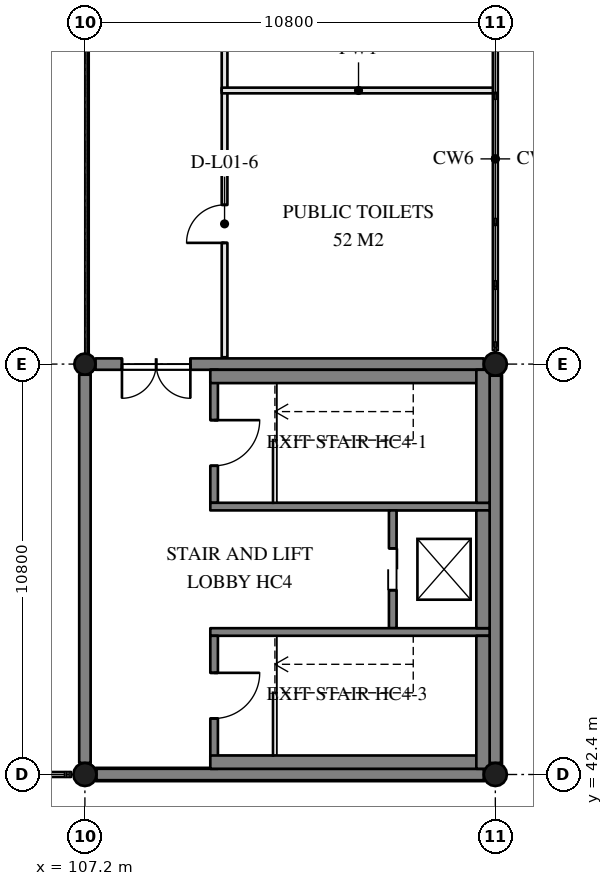
"""IFC4 building model, lengths in metres.
Left out: names, types, materials, properties, quantities, classifications, styles, units other than length and angle.
Written with IfcOpenShell. Run it as: python <this file> out.ifc"""

import sys

from ifc_helpers import new_model, si_unit, direction, frame, frame_2d, origin, origin_2d, place, context, subcontext, project, spatial, rectangle, hollow_circle, extrude, element, fill, save


model = new_model("IFC4")
c1 = context("Model", 3, precision=1e-05, world=origin(), true_north=direction((0.0, 1.0)))
c2 = subcontext(c1, "Body", "Model", "MODEL_VIEW")
j1 = project(units=[si_unit("LENGTHUNIT", "METRE"), si_unit("PLANEANGLEUNIT", "RADIAN")], contexts=[c1])
p1 = place(None, origin())
s1 = spatial("IfcSite", under=j1, at=p1, CompositionType="ELEMENT")
p2 = place(p1, origin())
s2 = spatial("IfcBuilding", under=s1, at=p2, CompositionType="ELEMENT")
p3 = place(p2, frame((0.0, 0.0, 4.8)))
s3 = spatial("IfcBuildingStorey", under=s2, at=p3, CompositionType="ELEMENT", Elevation=4.8)
p4 = place(p3, frame((107.2, 42.4, 0.0), z_axis=(0.0, 0.0, 1.0), x_axis=(1.0, 0.0, 0.0)))
e1 = element("IfcColumn", 1, at=p4, inside=s3, PredefinedType="COLUMN", context=c2, shape_type="SweptSolid", body=[
    extrude(hollow_circle(Radius=0.305, WallThickness=0.025, at=origin_2d()), origin(), (0.0, 0.0, 1.0), 2.49),
])
p5 = place(p3, frame((107.2, 53.2, 0.0), z_axis=(0.0, 0.0, 1.0), x_axis=(1.0, 0.0, 0.0)))
e2 = element("IfcColumn", 2, at=p5, inside=s3, PredefinedType="COLUMN", context=c2, shape_type="SweptSolid", body=[
    extrude(hollow_circle(Radius=0.28, WallThickness=0.02, at=origin_2d()), origin(), (0.0, 0.0, 1.0), 2.564),
])
p6 = place(p3, frame((118.0, 42.4, 0.0), z_axis=(0.0, 0.0, 1.0), x_axis=(1.0, 0.0, 0.0)))
e3 = element("IfcColumn", 3, at=p6, inside=s3, PredefinedType="COLUMN", context=c2, shape_type="SweptSolid", body=[
    extrude(hollow_circle(Radius=0.305, WallThickness=0.025, at=origin_2d()), origin(), (0.0, 0.0, 1.0), 2.49),
])
p7 = place(p3, frame((118.0, 53.2, 0.0), z_axis=(0.0, 0.0, 1.0), x_axis=(1.0, 0.0, 0.0)))
e4 = element("IfcColumn", 4, at=p7, inside=s3, PredefinedType="COLUMN", context=c2, shape_type="SweptSolid", body=[
    extrude(hollow_circle(Radius=0.305, WallThickness=0.025, at=origin_2d()), origin(), (0.0, 0.0, 1.0), 2.564),
])
p8 = place(p3, frame((107.505, 42.4, 0.0), z_axis=(0.0, 0.0, 1.0), x_axis=(1.0, 0.0, 0.0)))
e5 = element("IfcWall", 5, at=p8, inside=s3, PredefinedType="SOLIDWALL", context=c2, shape_type="SweptSolid", body=[
    extrude(rectangle(XDim=10.19, YDim=0.3, at=frame_2d((5.095, 0.0))), origin(), (0.0, 0.0, 1.0), 3.9),
])
p9 = place(p3, frame((118.0, 42.705, 0.0), z_axis=(0.0, 0.0, 1.0), x_axis=(0.0, 1.0, 0.0)))
e6 = element("IfcWall", 6, at=p9, inside=s3, PredefinedType="SOLIDWALL", context=c2, shape_type="SweptSolid", body=[
    extrude(rectangle(XDim=10.19, YDim=0.3, at=frame_2d((5.095, 0.0))), origin(), (0.0, 0.0, 1.0), 3.9),
])
p10 = place(p3, frame((117.695, 53.2, 0.0), z_axis=(0.0, 0.0, 1.0), x_axis=(-1.0, 0.0, 0.0)))
e7 = element("IfcWall", 7, at=p10, inside=s3, PredefinedType="SOLIDWALL", context=c2, shape_type="SweptSolid", body=[
    extrude(rectangle(XDim=10.216, YDim=0.3, at=frame_2d((5.108, 0.0))), origin(), (0.0, 0.0, 1.0), 3.9),
])
p11 = place(p10, frame((7.72, 0.0, 0.0)))
e8 = element("IfcOpeningElement", 8, at=p11, cuts=e7, PredefinedType="OPENING", context=c2, shape_type="SweptSolid", body=[
    extrude(rectangle(XDim=1.8, YDim=2.1, at=frame_2d((0.9, 1.05))), frame((0.0, 0.16, 0.0), z_axis=(0.0, -1.0, 0.0), x_axis=(1.0, 0.0, 0.0)), (0.0, 0.0, 1.0), 0.32),
])
p12 = place(p3, frame((107.2, 52.92, 0.0), z_axis=(0.0, 0.0, 1.0), x_axis=(0.0, -1.0, 0.0)))
e9 = element("IfcWall", 9, at=p12, inside=s3, PredefinedType="SOLIDWALL", context=c2, shape_type="SweptSolid", body=[
    extrude(rectangle(XDim=10.215, YDim=0.3, at=frame_2d((5.108, 0.0))), origin(), (0.0, 0.0, 1.0), 3.9),
])
p13 = place(p3, frame((107.2, 53.2, 2.594), z_axis=(0.0, 0.0, 1.0), x_axis=(1.0, 0.0, 0.0)))
e10 = element("IfcColumn", 10, at=p13, inside=s3, PredefinedType="COLUMN", context=c2, shape_type="SweptSolid", body=[
    extrude(hollow_circle(Radius=0.203, WallThickness=0.016, at=origin_2d()), origin(), (0.0, 0.0, 1.0), 9.655),
])
p14 = place(p3, frame((107.48, 42.4, 3.9), z_axis=(0.0, 0.0, 1.0), x_axis=(1.0, 0.0, 0.0)))
e11 = element("IfcWall", 11, at=p14, inside=s3, PredefinedType="SOLIDWALL", context=c2, shape_type="SweptSolid", body=[
    extrude(rectangle(XDim=10.24, YDim=0.35, at=frame_2d((5.12, 0.0))), origin(), (0.0, 0.0, 1.0), 1.743),
])
p15 = place(p3, frame((118.0, 42.68, 3.9), z_axis=(0.0, 0.0, 1.0), x_axis=(0.0, 1.0, 0.0)))
e12 = element("IfcWall", 12, at=p15, inside=s3, PredefinedType="SOLIDWALL", context=c2, shape_type="SweptSolid", body=[
    extrude(rectangle(XDim=10.24, YDim=0.35, at=frame_2d((5.12, 0.0))), origin(), (0.0, 0.0, 1.0), 1.794),
])
p16 = place(p3, frame((110.6, 53.05, 0.0), z_axis=(0.0, 0.0, 1.0), x_axis=(0.0, -1.0, 0.0)))
e13 = element("IfcWall", 13, at=p16, inside=s3, PredefinedType="SOLIDWALL", context=c2, shape_type="SweptSolid", body=[
    extrude(rectangle(XDim=3.5, YDim=0.2, at=frame_2d((1.75, 0.0))), origin(), (0.0, 0.0, 1.0), 3.6),
])
p17 = place(p16, frame((1.325, 0.0, 0.0)))
e14 = element("IfcOpeningElement", 14, at=p17, cuts=e13, PredefinedType="OPENING", context=c2, shape_type="SweptSolid", body=[
    extrude(rectangle(XDim=1.2, YDim=2.1, at=frame_2d((0.6, 1.05))), frame((0.0, 0.11, 0.0), z_axis=(0.0, -1.0, 0.0), x_axis=(1.0, 0.0, 0.0)), (0.0, 0.0, 1.0), 0.22),
])
p18 = place(p3, frame((110.5, 49.45, 0.0), z_axis=(0.0, 0.0, 1.0), x_axis=(1.0, 0.0, 0.0)))
e15 = element("IfcWall", 15, at=p18, inside=s3, PredefinedType="SOLIDWALL", context=c2, shape_type="SweptSolid", body=[
    extrude(rectangle(XDim=7.35, YDim=0.2, at=frame_2d((3.675, 0.0))), origin(), (0.0, 0.0, 1.0), 3.6),
])
p19 = place(p3, frame((115.3, 49.35, 0.0), z_axis=(0.0, 0.0, 1.0), x_axis=(0.0, -1.0, 0.0)))
e16 = element("IfcWall", 16, at=p19, inside=s3, PredefinedType="SOLIDWALL", context=c2, shape_type="SweptSolid", body=[
    extrude(rectangle(XDim=3.1, YDim=0.2, at=frame_2d((1.55, 0.0))), origin(), (0.0, 0.0, 1.0), 3.6),
])
p20 = place(p19, frame((1.0, 0.0, 0.0)))
e17 = element("IfcOpeningElement", 17, at=p20, cuts=e16, PredefinedType="OPENING", context=c2, shape_type="SweptSolid", body=[
    extrude(rectangle(XDim=1.1, YDim=2.1, at=frame_2d((0.55, 1.05))), frame((0.0, 0.11, 0.0), z_axis=(0.0, -1.0, 0.0), x_axis=(1.0, 0.0, 0.0)), (0.0, 0.0, 1.0), 0.22),
])
p21 = place(p3, frame((110.5, 46.15, 0.0), z_axis=(0.0, 0.0, 1.0), x_axis=(1.0, 0.0, 0.0)))
e18 = element("IfcWall", 18, at=p21, inside=s3, PredefinedType="SOLIDWALL", context=c2, shape_type="SweptSolid", body=[
    extrude(rectangle(XDim=7.35, YDim=0.2, at=frame_2d((3.675, 0.0))), origin(), (0.0, 0.0, 1.0), 3.6),
])
p22 = place(p3, frame((110.6, 46.05, 0.0), z_axis=(0.0, 0.0, 1.0), x_axis=(0.0, -1.0, 0.0)))
e19 = element("IfcWall", 19, at=p22, inside=s3, PredefinedType="SOLIDWALL", context=c2, shape_type="SweptSolid", body=[
    extrude(rectangle(XDim=3.5, YDim=0.2, at=frame_2d((1.75, 0.0))), origin(), (0.0, 0.0, 1.0), 3.6),
])
p23 = place(p22, frame((0.975, 0.0, 0.0)))
e20 = element("IfcOpeningElement", 20, at=p23, cuts=e19, PredefinedType="OPENING", context=c2, shape_type="SweptSolid", body=[
    extrude(rectangle(XDim=1.2, YDim=2.1, at=frame_2d((0.6, 1.05))), frame((0.0, 0.11, 0.0), z_axis=(0.0, -1.0, 0.0), x_axis=(1.0, 0.0, 0.0)), (0.0, 0.0, 1.0), 0.22),
])
p24 = place(p3, frame((110.5, 52.875, -0.4), z_axis=(0.0, 0.0, 1.0), x_axis=(1.0, 0.0, 0.0)))
e21 = element("IfcWall", 21, at=p24, inside=s3, PredefinedType="SOLIDWALL", context=c2, shape_type="SweptSolid", body=[
    extrude(rectangle(XDim=7.35, YDim=0.35, at=frame_2d((3.675, 0.0))), origin(), (0.0, 0.0, 1.0), 4.0),
])
p25 = place(p3, frame((117.675, 53.05, -0.4), z_axis=(0.0, 0.0, 1.0), x_axis=(0.0, -1.0, 0.0)))
e22 = element("IfcWall", 22, at=p25, inside=s3, PredefinedType="SOLIDWALL", context=c2, shape_type="SweptSolid", body=[
    extrude(rectangle(XDim=3.5, YDim=0.35, at=frame_2d((1.75, 0.0))), origin(), (0.0, 0.0, 1.0), 4.0),
])
p26 = place(p3, frame((110.5, 42.725, -0.4), z_axis=(0.0, 0.0, 1.0), x_axis=(1.0, 0.0, 0.0)))
e23 = element("IfcWall", 23, at=p26, inside=s3, PredefinedType="SOLIDWALL", context=c2, shape_type="SweptSolid", body=[
    extrude(rectangle(XDim=7.35, YDim=0.35, at=frame_2d((3.675, 0.0))), origin(), (0.0, 0.0, 1.0), 4.0),
])
p27 = place(p3, frame((117.675, 46.05, -0.4), z_axis=(0.0, 0.0, 1.0), x_axis=(0.0, -1.0, 0.0)))
e24 = element("IfcWall", 24, at=p27, inside=s3, PredefinedType="SOLIDWALL", context=c2, shape_type="SweptSolid", body=[
    extrude(rectangle(XDim=3.5, YDim=0.35, at=frame_2d((1.75, 0.0))), origin(), (0.0, 0.0, 1.0), 4.0),
])
p28 = place(p3, frame((117.675, 49.35, -0.4), z_axis=(0.0, 0.0, 1.0), x_axis=(0.0, -1.0, 0.0)))
e25 = element("IfcWall", 25, at=p28, inside=s3, PredefinedType="SOLIDWALL", context=c2, shape_type="SweptSolid", body=[
    extrude(rectangle(XDim=3.1, YDim=0.35, at=frame_2d((1.55, 0.0))), origin(), (0.0, 0.0, 1.0), 4.0),
])
p29 = place(p3, frame((110.875, 53.38, 0.0), z_axis=(0.0, 0.0, 1.0), x_axis=(0.0, 1.0, 0.0)))
e26 = element("IfcWall", 26, at=p29, inside=s3, PredefinedType="PARTITIONING", context=c2, shape_type="SweptSolid", body=[
    extrude(rectangle(XDim=7.02, YDim=0.15, at=frame_2d((3.51, 0.0))), origin(), (0.0, 0.0, 1.0), 7.574),
])
p30 = place(p29, frame((3.01, 0.0, 0.0)))
e27 = element("IfcOpeningElement", 27, at=p30, cuts=e26, PredefinedType="OPENING", context=c2, shape_type="SweptSolid", body=[
    extrude(rectangle(XDim=1.0, YDim=2.1, at=frame_2d((0.5, 1.05))), frame((0.0, 0.085, 0.0), z_axis=(0.0, -1.0, 0.0), x_axis=(1.0, 0.0, 0.0)), (0.0, 0.0, 1.0), 0.17),
])
p31 = place(p3, frame((110.875, 60.4, 0.0), z_axis=(0.0, 0.0, 1.0), x_axis=(0.0, 1.0, 0.0)))
e28 = element("IfcWall", 28, at=p31, inside=s3, PredefinedType="PARTITIONING", context=c2, shape_type="SweptSolid", body=[
    extrude(rectangle(XDim=3.6, YDim=0.15, at=frame_2d((1.8, 0.0))), origin(), (0.0, 0.0, 1.0), 7.574),
])
p32 = place(p31, frame((1.3, 0.0, 0.0)))
e29 = element("IfcOpeningElement", 29, at=p32, cuts=e28, PredefinedType="OPENING", context=c2, shape_type="SweptSolid", body=[
    extrude(rectangle(XDim=1.0, YDim=2.1, at=frame_2d((0.5, 1.05))), frame((0.0, 0.085, 0.0), z_axis=(0.0, -1.0, 0.0), x_axis=(1.0, 0.0, 0.0)), (0.0, 0.0, 1.0), 0.17),
])
p33 = place(p3, frame((110.8, 60.4, 0.0), z_axis=(0.0, 0.0, 1.0), x_axis=(1.0, 0.0, 0.0)))
e30 = element("IfcWall", 30, at=p33, inside=s3, PredefinedType="PARTITIONING", context=c2, shape_type="SweptSolid", body=[
    extrude(rectangle(XDim=7.2, YDim=0.15, at=frame_2d((3.6, 0.0))), origin(), (0.0, 0.0, 1.0), 7.574),
])
p34 = place(p20, frame((1.1, 0.0, 0.0), z_axis=(0.0, 0.0, 1.0), x_axis=(-1.0, 0.0, 0.0)))
e31 = element("IfcDoor", 31, at=p34, inside=s3, OperationType="DOUBLE_DOOR_SLIDING", PredefinedType="DOOR", context=c2, shape_type="SweptSolid", body=[
    extrude(rectangle(XDim=1.1, YDim=2.1, at=frame_2d((0.55, 1.05))), frame((0.0, 0.025, 0.0), z_axis=(0.0, -1.0, 0.0), x_axis=(1.0, 0.0, 0.0)), (0.0, 0.0, 1.0), 0.05),
])
fill(e17, e31)
p35 = place(p17, frame((1.2, 0.0, 0.0), z_axis=(0.0, 0.0, 1.0), x_axis=(-1.0, 0.0, 0.0)))
e32 = element("IfcDoor", 32, at=p35, inside=s3, OperationType="SINGLE_SWING_LEFT", PredefinedType="DOOR", context=c2, shape_type="SweptSolid", body=[
    extrude(rectangle(XDim=1.2, YDim=2.1, at=frame_2d((0.6, 1.05))), frame((0.0, 0.025, 0.0), z_axis=(0.0, -1.0, 0.0), x_axis=(1.0, 0.0, 0.0)), (0.0, 0.0, 1.0), 0.05),
])
fill(e14, e32)
p36 = place(p23, frame((1.2, 0.0, 0.0), z_axis=(0.0, 0.0, 1.0), x_axis=(-1.0, 0.0, 0.0)))
e33 = element("IfcDoor", 33, at=p36, inside=s3, OperationType="SINGLE_SWING_RIGHT", PredefinedType="DOOR", context=c2, shape_type="SweptSolid", body=[
    extrude(rectangle(XDim=1.2, YDim=2.1, at=frame_2d((0.6, 1.05))), frame((0.0, 0.025, 0.0), z_axis=(0.0, -1.0, 0.0), x_axis=(1.0, 0.0, 0.0)), (0.0, 0.0, 1.0), 0.05),
])
fill(e20, e33)
p37 = place(p11, frame((1.8, 0.0, 0.0), z_axis=(0.0, 0.0, 1.0), x_axis=(-1.0, 0.0, 0.0)))
e34 = element("IfcDoor", 34, at=p37, inside=s3, OperationType="DOUBLE_DOOR_DOUBLE_SWING", PredefinedType="DOOR", context=c2, shape_type="SweptSolid", body=[
    extrude(rectangle(XDim=1.8, YDim=2.1, at=frame_2d((0.9, 1.05))), frame((0.0, 0.025, 0.0), z_axis=(0.0, -1.0, 0.0), x_axis=(1.0, 0.0, 0.0)), (0.0, 0.0, 1.0), 0.05),
])
fill(e8, e34)
p38 = place(p30, frame((1.0, 0.0, 0.0), z_axis=(0.0, 0.0, 1.0), x_axis=(-1.0, 0.0, 0.0)))
e35 = element("IfcDoor", 35, at=p38, inside=s3, OperationType="SINGLE_SWING_RIGHT", PredefinedType="DOOR", context=c2, shape_type="SweptSolid", body=[
    extrude(rectangle(XDim=1.0, YDim=2.1, at=frame_2d((0.5, 1.05))), frame((0.0, 0.025, 0.0), z_axis=(0.0, -1.0, 0.0), x_axis=(1.0, 0.0, 0.0)), (0.0, 0.0, 1.0), 0.05),
])
fill(e27, e35)
save(model, sys.argv[1])
